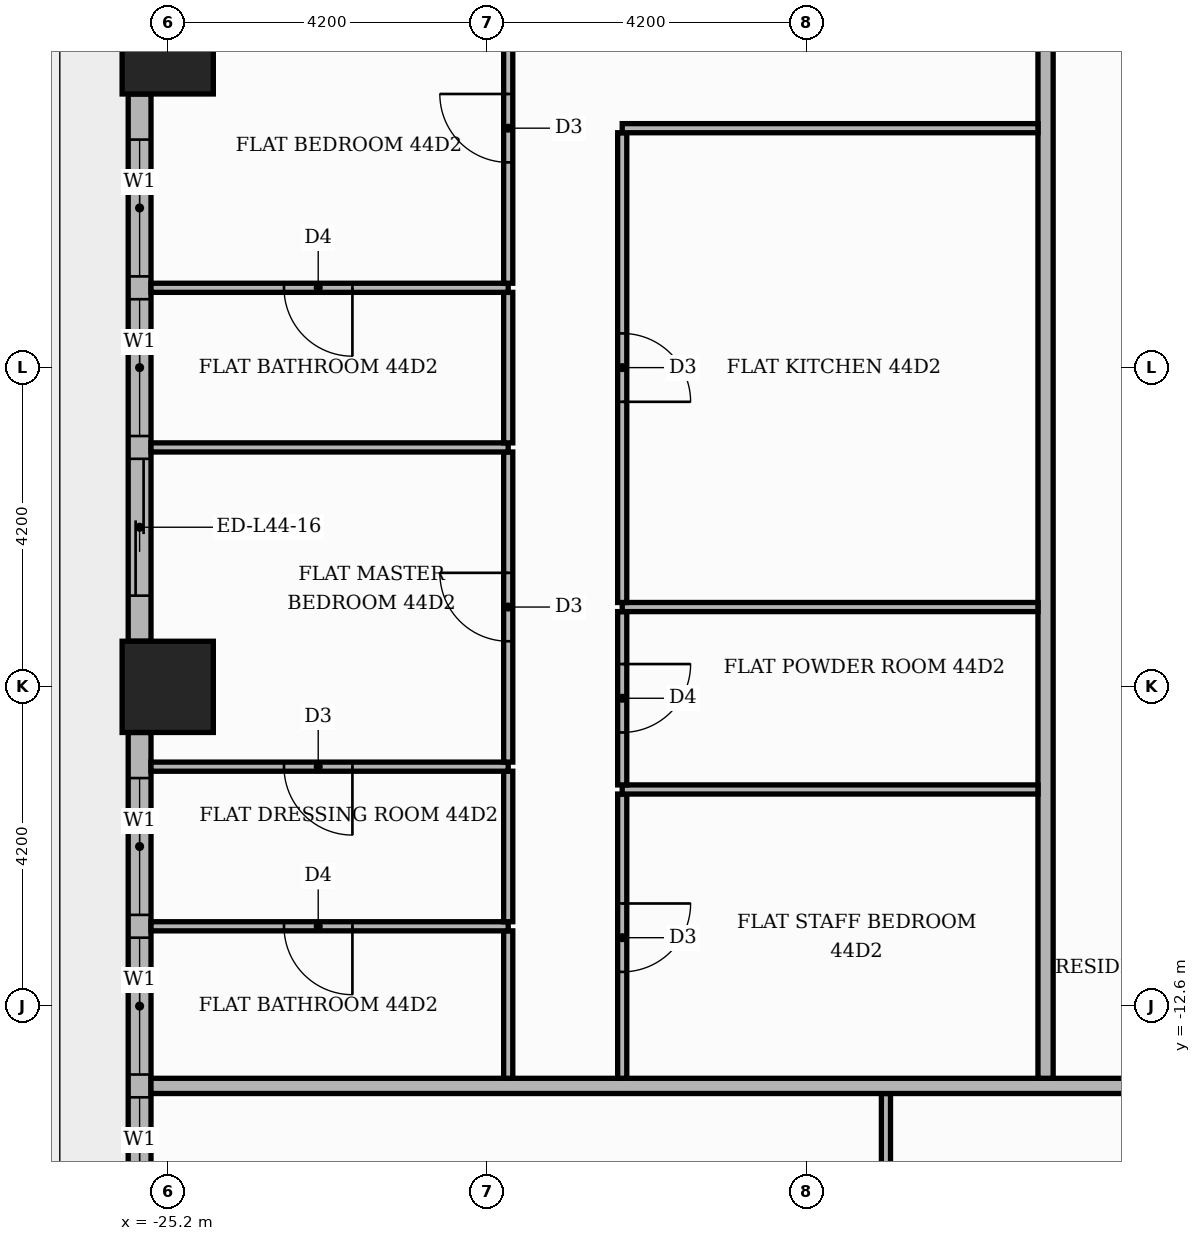
"""IFC4 building model, lengths in metres.
Left out: names, types, materials, properties, quantities, classifications, styles, units other than length and angle.
Written with IfcOpenShell. Run it as: python <this file> out.ifc"""

import sys

from ifc_helpers import new_model, si_unit, direction, frame, frame_2d, origin, origin_2d, place, context, subcontext, project, spatial, rectangle, extrude, element, fill, save


model = new_model("IFC4")
c1 = context("Model", 3, precision=1e-05, world=origin(), true_north=direction((0.0, 1.0)))
c2 = subcontext(c1, "Body", "Model", "MODEL_VIEW")
j1 = project(units=[si_unit("LENGTHUNIT", "METRE"), si_unit("PLANEANGLEUNIT", "RADIAN")], contexts=[c1])
p1 = place(None, origin())
s1 = spatial("IfcSite", under=j1, at=p1, CompositionType="ELEMENT")
p2 = place(p1, origin())
s2 = spatial("IfcBuilding", under=s1, at=p2, CompositionType="ELEMENT")
p3 = place(p2, frame((0.0, 0.0, 188.4)))
s3 = spatial("IfcBuildingStorey", under=s2, at=p3, CompositionType="ELEMENT", Elevation=188.4)
for number, where, z_axis, x_axis in (
    (1, (-25.2, 0.0, 0.0), (0.0, 0.0, 1.0), (1.0, 0.0, 0.0)),
    (2, (-25.2, -8.4, 0.0), (0.0, 0.0, 1.0), (1.0, 0.0, 0.0)),
):
    element("IfcColumn", number, at=place(p3, frame(where, z_axis=z_axis, x_axis=x_axis)), inside=s3, PredefinedType="COLUMN", context=c2, shape_type="SweptSolid", body=[
        extrude(rectangle(XDim=1.2, YDim=1.2, at=origin_2d()), origin(), (0.0, 0.0, 1.0), 3.9),
    ])
p4 = place(p3, frame((-25.57, -0.6, 0.0), z_axis=(0.0, 0.0, 1.0), x_axis=(0.0, -1.0, 0.0)))
e3 = element("IfcWall", 3, at=p4, inside=s3, PredefinedType="STANDARD", context=c2, shape_type="SweptSolid", body=[
    extrude(rectangle(XDim=7.2, YDim=0.3, at=frame_2d((3.6, 0.0))), origin(), (0.0, 0.0, 1.0), 3.48),
])
p5 = place(p4, frame((0.6, 0.0, 0.9)))
e4 = element("IfcOpeningElement", 4, at=p5, cuts=e3, PredefinedType="OPENING", context=c2, shape_type="SweptSolid", body=[
    extrude(rectangle(XDim=1.8, YDim=2.1, at=frame_2d((0.9, 1.05))), frame((0.0, 0.16, 0.0), z_axis=(0.0, -1.0, 0.0), x_axis=(1.0, 0.0, 0.0)), (0.0, 0.0, 1.0), 0.32),
])
p6 = place(p4, frame((2.7, 0.0, 0.9)))
e5 = element("IfcOpeningElement", 5, at=p6, cuts=e3, PredefinedType="OPENING", context=c2, shape_type="SweptSolid", body=[
    extrude(rectangle(XDim=1.8, YDim=2.1, at=frame_2d((0.9, 1.05))), frame((0.0, 0.16, 0.0), z_axis=(0.0, -1.0, 0.0), x_axis=(1.0, 0.0, 0.0)), (0.0, 0.0, 1.0), 0.32),
])
p7 = place(p4, frame((4.8, 0.0, 0.0)))
e6 = element("IfcOpeningElement", 6, at=p7, cuts=e3, PredefinedType="OPENING", context=c2, shape_type="SweptSolid", body=[
    extrude(rectangle(XDim=1.8, YDim=2.4, at=frame_2d((0.9, 1.2))), frame((0.0, 0.16, 0.0), z_axis=(0.0, -1.0, 0.0), x_axis=(1.0, 0.0, 0.0)), (0.0, 0.0, 1.0), 0.32),
])
p8 = place(p3, frame((-25.57, -9.0, 0.0), z_axis=(0.0, 0.0, 1.0), x_axis=(0.0, -1.0, 0.0)))
e7 = element("IfcWall", 7, at=p8, inside=s3, PredefinedType="STANDARD", context=c2, shape_type="SweptSolid", body=[
    extrude(rectangle(XDim=7.2, YDim=0.3, at=frame_2d((3.6, 0.0))), origin(), (0.0, 0.0, 1.0), 3.48),
])
p9 = place(p8, frame((0.6, 0.0, 0.9)))
e8 = element("IfcOpeningElement", 8, at=p9, cuts=e7, PredefinedType="OPENING", context=c2, shape_type="SweptSolid", body=[
    extrude(rectangle(XDim=1.8, YDim=2.1, at=frame_2d((0.9, 1.05))), frame((0.0, 0.16, 0.0), z_axis=(0.0, -1.0, 0.0), x_axis=(1.0, 0.0, 0.0)), (0.0, 0.0, 1.0), 0.32),
])
p10 = place(p8, frame((2.7, 0.0, 0.9)))
e9 = element("IfcOpeningElement", 9, at=p10, cuts=e7, PredefinedType="OPENING", context=c2, shape_type="SweptSolid", body=[
    extrude(rectangle(XDim=1.8, YDim=2.1, at=frame_2d((0.9, 1.05))), frame((0.0, 0.16, 0.0), z_axis=(0.0, -1.0, 0.0), x_axis=(1.0, 0.0, 0.0)), (0.0, 0.0, 1.0), 0.32),
])
p11 = place(p8, frame((4.8, 0.0, 0.9)))
e10 = element("IfcOpeningElement", 10, at=p11, cuts=e7, PredefinedType="OPENING", context=c2, shape_type="SweptSolid", body=[
    extrude(rectangle(XDim=1.8, YDim=2.1, at=frame_2d((0.9, 1.05))), frame((0.0, 0.16, 0.0), z_axis=(0.0, -1.0, 0.0), x_axis=(1.0, 0.0, 0.0)), (0.0, 0.0, 1.0), 0.32),
])
p12 = place(p3, frame((-15.75, -20.06, 0.0), z_axis=(0.0, 0.0, 1.0), x_axis=(0.0, 1.0, 0.0)))
e11 = element("IfcWall", 11, at=p12, inside=s3, PredefinedType="PARTITIONING", context=c2, shape_type="SweptSolid", body=[
    extrude(rectangle(XDim=6.31, YDim=0.12, at=frame_2d((3.155, 0.0))), origin(), (0.0, 0.0, 1.0), 3.48),
])
p13 = place(p12, frame((2.675, 0.0, 0.0)))
e12 = element("IfcOpeningElement", 12, at=p13, cuts=e11, PredefinedType="OPENING", context=c2, shape_type="SweptSolid", body=[
    extrude(rectangle(XDim=1.0, YDim=2.1, at=frame_2d((0.5, 1.05))), frame((0.0, 0.07, 0.0), z_axis=(0.0, -1.0, 0.0), x_axis=(1.0, 0.0, 0.0)), (0.0, 0.0, 1.0), 0.14),
])
p14 = place(p3, frame((-25.42, -13.65, 0.0), z_axis=(0.0, 0.0, 1.0), x_axis=(1.0, 0.0, 0.0)))
e13 = element("IfcWall", 13, at=p14, inside=s3, PredefinedType="PARTITIONING", context=c2, shape_type="SweptSolid", body=[
    extrude(rectangle(XDim=39.07, YDim=0.2, at=frame_2d((19.535, 0.0))), origin(), (0.0, 0.0, 1.0), 3.48),
])
p15 = place(p14, frame((13.32, 0.0, 0.0)))
e14 = element("IfcOpeningElement", 14, at=p15, cuts=e13, PredefinedType="OPENING", context=c2, shape_type="SweptSolid", body=[
    extrude(rectangle(XDim=1.1, YDim=2.4, at=frame_2d((0.55, 1.2))), frame((0.0, 0.11, 0.0), z_axis=(0.0, -1.0, 0.0), x_axis=(1.0, 0.0, 0.0)), (0.0, 0.0, 1.0), 0.22),
])
p16 = place(p14, frame((21.72, 0.0, 0.0)))
e15 = element("IfcOpeningElement", 15, at=p16, cuts=e13, PredefinedType="OPENING", context=c2, shape_type="SweptSolid", body=[
    extrude(rectangle(XDim=1.1, YDim=2.4, at=frame_2d((0.55, 1.2))), frame((0.0, 0.11, 0.0), z_axis=(0.0, -1.0, 0.0), x_axis=(1.0, 0.0, 0.0)), (0.0, 0.0, 1.0), 0.22),
])
p17 = place(p3, frame((-20.72, -13.55, 0.0), z_axis=(0.0, 0.0, 1.0), x_axis=(0.0, 1.0, 0.0)))
e16 = element("IfcWall", 16, at=p17, inside=s3, PredefinedType="PARTITIONING", context=c2, shape_type="SweptSolid", body=[
    extrude(rectangle(XDim=1.94, YDim=0.12, at=frame_2d((0.97, 0.0))), origin(), (0.0, 0.0, 1.0), 3.48),
])
p18 = place(p3, frame((-19.22, -13.55, 0.0), z_axis=(0.0, 0.0, 1.0), x_axis=(0.0, 1.0, 0.0)))
e17 = element("IfcWall", 17, at=p18, inside=s3, PredefinedType="PARTITIONING", context=c2, shape_type="SweptSolid", body=[
    extrude(rectangle(XDim=3.74, YDim=0.12, at=frame_2d((1.87, 0.0))), origin(), (0.0, 0.0, 1.0), 3.48),
])
p19 = place(p18, frame((1.4, 0.0, 0.0)))
e18 = element("IfcOpeningElement", 18, at=p19, cuts=e17, PredefinedType="OPENING", context=c2, shape_type="SweptSolid", body=[
    extrude(rectangle(XDim=0.9, YDim=2.1, at=frame_2d((0.45, 1.05))), frame((0.0, 0.07, 0.0), z_axis=(0.0, -1.0, 0.0), x_axis=(1.0, 0.0, 0.0)), (0.0, 0.0, 1.0), 0.14),
])
p20 = place(p3, frame((-13.65, -13.55, 0.0), z_axis=(0.0, 0.0, 1.0), x_axis=(0.0, 1.0, 0.0)))
e19 = element("IfcWall", 19, at=p20, inside=s3, PredefinedType="PARTITIONING", context=c2, shape_type="SweptSolid", body=[
    extrude(rectangle(XDim=18.7, YDim=0.2, at=frame_2d((9.35, 0.0))), origin(), (0.0, 0.0, 1.0), 3.48),
])
p21 = place(p20, frame((14.05, 0.0, 0.0)))
e20 = element("IfcOpeningElement", 20, at=p21, cuts=e19, PredefinedType="OPENING", context=c2, shape_type="SweptSolid", body=[
    extrude(rectangle(XDim=1.1, YDim=2.4, at=frame_2d((0.55, 1.2))), frame((0.0, 0.11, 0.0), z_axis=(0.0, -1.0, 0.0), x_axis=(1.0, 0.0, 0.0)), (0.0, 0.0, 1.0), 0.22),
])
p22 = place(p3, frame((-25.42, -11.55, 0.0), z_axis=(0.0, 0.0, 1.0), x_axis=(1.0, 0.0, 0.0)))
e21 = element("IfcWall", 21, at=p22, inside=s3, PredefinedType="PARTITIONING", context=c2, shape_type="SweptSolid", body=[
    extrude(rectangle(XDim=4.7, YDim=0.12, at=frame_2d((2.35, 0.0))), origin(), (0.0, 0.0, 1.0), 3.48),
])
p23 = place(p22, frame((1.75, 0.0, 0.0)))
e22 = element("IfcOpeningElement", 22, at=p23, cuts=e21, PredefinedType="OPENING", context=c2, shape_type="SweptSolid", body=[
    extrude(rectangle(XDim=0.9, YDim=2.1, at=frame_2d((0.45, 1.05))), frame((0.0, 0.07, 0.0), z_axis=(0.0, -1.0, 0.0), x_axis=(1.0, 0.0, 0.0)), (0.0, 0.0, 1.0), 0.14),
])
p24 = place(p3, frame((-20.72, -11.49, 0.0), z_axis=(0.0, 0.0, 1.0), x_axis=(0.0, 1.0, 0.0)))
e23 = element("IfcWall", 23, at=p24, inside=s3, PredefinedType="PARTITIONING", context=c2, shape_type="SweptSolid", body=[
    extrude(rectangle(XDim=1.98, YDim=0.12, at=frame_2d((0.99, 0.0))), origin(), (0.0, 0.0, 1.0), 3.48),
])
p25 = place(p3, frame((-19.22, -9.75, 0.0), z_axis=(0.0, 0.0, 1.0), x_axis=(1.0, 0.0, 0.0)))
e24 = element("IfcWall", 24, at=p25, inside=s3, PredefinedType="PARTITIONING", context=c2, shape_type="SweptSolid", body=[
    extrude(rectangle(XDim=5.47, YDim=0.12, at=frame_2d((2.735, 0.0))), origin(), (0.0, 0.0, 1.0), 3.48),
])
p26 = place(p3, frame((-19.22, -9.69, 0.0), z_axis=(0.0, 0.0, 1.0), x_axis=(0.0, 1.0, 0.0)))
e25 = element("IfcWall", 25, at=p26, inside=s3, PredefinedType="PARTITIONING", context=c2, shape_type="SweptSolid", body=[
    extrude(rectangle(XDim=2.28, YDim=0.12, at=frame_2d((1.14, 0.0))), origin(), (0.0, 0.0, 1.0), 3.48),
])
p27 = place(p26, frame((0.69, 0.0, 0.0)))
e26 = element("IfcOpeningElement", 26, at=p27, cuts=e25, PredefinedType="OPENING", context=c2, shape_type="SweptSolid", body=[
    extrude(rectangle(XDim=0.9, YDim=2.1, at=frame_2d((0.45, 1.05))), frame((0.0, 0.07, 0.0), z_axis=(0.0, -1.0, 0.0), x_axis=(1.0, 0.0, 0.0)), (0.0, 0.0, 1.0), 0.14),
])
p28 = place(p3, frame((-25.42, -9.45, 0.0), z_axis=(0.0, 0.0, 1.0), x_axis=(1.0, 0.0, 0.0)))
e27 = element("IfcWall", 27, at=p28, inside=s3, PredefinedType="PARTITIONING", context=c2, shape_type="SweptSolid", body=[
    extrude(rectangle(XDim=4.7, YDim=0.12, at=frame_2d((2.35, 0.0))), origin(), (0.0, 0.0, 1.0), 3.48),
])
p29 = place(p28, frame((1.75, 0.0, 0.0)))
e28 = element("IfcOpeningElement", 28, at=p29, cuts=e27, PredefinedType="OPENING", context=c2, shape_type="SweptSolid", body=[
    extrude(rectangle(XDim=0.9, YDim=2.1, at=frame_2d((0.45, 1.05))), frame((0.0, 0.07, 0.0), z_axis=(0.0, -1.0, 0.0), x_axis=(1.0, 0.0, 0.0)), (0.0, 0.0, 1.0), 0.14),
])
p30 = place(p3, frame((-20.72, -9.39, 0.0), z_axis=(0.0, 0.0, 1.0), x_axis=(0.0, 1.0, 0.0)))
e29 = element("IfcWall", 29, at=p30, inside=s3, PredefinedType="PARTITIONING", context=c2, shape_type="SweptSolid", body=[
    extrude(rectangle(XDim=4.08, YDim=0.12, at=frame_2d((2.04, 0.0))), origin(), (0.0, 0.0, 1.0), 3.48),
])
p31 = place(p30, frame((1.59, 0.0, 0.0)))
e30 = element("IfcOpeningElement", 30, at=p31, cuts=e29, PredefinedType="OPENING", context=c2, shape_type="SweptSolid", body=[
    extrude(rectangle(XDim=0.9, YDim=2.1, at=frame_2d((0.45, 1.05))), frame((0.0, 0.07, 0.0), z_axis=(0.0, -1.0, 0.0), x_axis=(1.0, 0.0, 0.0)), (0.0, 0.0, 1.0), 0.14),
])
p32 = place(p3, frame((-19.22, -7.35, 0.0), z_axis=(0.0, 0.0, 1.0), x_axis=(1.0, 0.0, 0.0)))
e31 = element("IfcWall", 31, at=p32, inside=s3, PredefinedType="PARTITIONING", context=c2, shape_type="SweptSolid", body=[
    extrude(rectangle(XDim=5.47, YDim=0.12, at=frame_2d((2.735, 0.0))), origin(), (0.0, 0.0, 1.0), 3.48),
])
p33 = place(p3, frame((-19.22, -7.29, 0.0), z_axis=(0.0, 0.0, 1.0), x_axis=(0.0, 1.0, 0.0)))
e32 = element("IfcWall", 32, at=p33, inside=s3, PredefinedType="PARTITIONING", context=c2, shape_type="SweptSolid", body=[
    extrude(rectangle(XDim=6.18, YDim=0.12, at=frame_2d((3.09, 0.0))), origin(), (0.0, 0.0, 1.0), 3.48),
])
p34 = place(p33, frame((2.64, 0.0, 0.0)))
e33 = element("IfcOpeningElement", 33, at=p34, cuts=e32, PredefinedType="OPENING", context=c2, shape_type="SweptSolid", body=[
    extrude(rectangle(XDim=0.9, YDim=2.1, at=frame_2d((0.45, 1.05))), frame((0.0, 0.07, 0.0), z_axis=(0.0, -1.0, 0.0), x_axis=(1.0, 0.0, 0.0)), (0.0, 0.0, 1.0), 0.14),
])
p35 = place(p3, frame((-25.42, -5.25, 0.0), z_axis=(0.0, 0.0, 1.0), x_axis=(1.0, 0.0, 0.0)))
e34 = element("IfcWall", 34, at=p35, inside=s3, PredefinedType="PARTITIONING", context=c2, shape_type="SweptSolid", body=[
    extrude(rectangle(XDim=4.7, YDim=0.12, at=frame_2d((2.35, 0.0))), origin(), (0.0, 0.0, 1.0), 3.48),
])
p36 = place(p3, frame((-20.72, -5.19, 0.0), z_axis=(0.0, 0.0, 1.0), x_axis=(0.0, 1.0, 0.0)))
e35 = element("IfcWall", 35, at=p36, inside=s3, PredefinedType="PARTITIONING", context=c2, shape_type="SweptSolid", body=[
    extrude(rectangle(XDim=1.98, YDim=0.12, at=frame_2d((0.99, 0.0))), origin(), (0.0, 0.0, 1.0), 3.48),
])
p37 = place(p3, frame((-25.42, -3.15, 0.0), z_axis=(0.0, 0.0, 1.0), x_axis=(1.0, 0.0, 0.0)))
e36 = element("IfcWall", 36, at=p37, inside=s3, PredefinedType="PARTITIONING", context=c2, shape_type="SweptSolid", body=[
    extrude(rectangle(XDim=4.7, YDim=0.12, at=frame_2d((2.35, 0.0))), origin(), (0.0, 0.0, 1.0), 3.48),
])
p38 = place(p37, frame((1.75, 0.0, 0.0)))
e37 = element("IfcOpeningElement", 37, at=p38, cuts=e36, PredefinedType="OPENING", context=c2, shape_type="SweptSolid", body=[
    extrude(rectangle(XDim=0.9, YDim=2.1, at=frame_2d((0.45, 1.05))), frame((0.0, 0.07, 0.0), z_axis=(0.0, -1.0, 0.0), x_axis=(1.0, 0.0, 0.0)), (0.0, 0.0, 1.0), 0.14),
])
p39 = place(p3, frame((-20.72, -3.09, 0.0), z_axis=(0.0, 0.0, 1.0), x_axis=(0.0, 1.0, 0.0)))
e38 = element("IfcWall", 38, at=p39, inside=s3, PredefinedType="PARTITIONING", context=c2, shape_type="SweptSolid", body=[
    extrude(rectangle(XDim=4.08, YDim=0.12, at=frame_2d((2.04, 0.0))), origin(), (0.0, 0.0, 1.0), 3.48),
])
p40 = place(p39, frame((1.59, 0.0, 0.0)))
e39 = element("IfcOpeningElement", 39, at=p40, cuts=e38, PredefinedType="OPENING", context=c2, shape_type="SweptSolid", body=[
    extrude(rectangle(XDim=0.9, YDim=2.1, at=frame_2d((0.45, 1.05))), frame((0.0, 0.07, 0.0), z_axis=(0.0, -1.0, 0.0), x_axis=(1.0, 0.0, 0.0)), (0.0, 0.0, 1.0), 0.14),
])
p41 = place(p3, frame((-19.22, -1.05, 0.0), z_axis=(0.0, 0.0, 1.0), x_axis=(1.0, 0.0, 0.0)))
e40 = element("IfcWall", 40, at=p41, inside=s3, PredefinedType="PARTITIONING", context=c2, shape_type="SweptSolid", body=[
    extrude(rectangle(XDim=5.47, YDim=0.12, at=frame_2d((2.735, 0.0))), origin(), (0.0, 0.0, 1.0), 3.48),
])
p42 = place(p5, origin())
e41 = element("IfcWindow", 41, at=p42, inside=s3, PartitioningType="SINGLE_PANEL", PredefinedType="WINDOW", context=c2, shape_type="SweptSolid", body=[
    extrude(rectangle(XDim=1.8, YDim=2.1, at=frame_2d((0.9, 1.05))), frame((0.0, 0.03, 0.0), z_axis=(0.0, -1.0, 0.0), x_axis=(1.0, 0.0, 0.0)), (0.0, 0.0, 1.0), 0.06),
])
fill(e4, e41)
p43 = place(p6, origin())
e42 = element("IfcWindow", 42, at=p43, inside=s3, PartitioningType="SINGLE_PANEL", PredefinedType="WINDOW", context=c2, shape_type="SweptSolid", body=[
    extrude(rectangle(XDim=1.8, YDim=2.1, at=frame_2d((0.9, 1.05))), frame((0.0, 0.03, 0.0), z_axis=(0.0, -1.0, 0.0), x_axis=(1.0, 0.0, 0.0)), (0.0, 0.0, 1.0), 0.06),
])
fill(e5, e42)
p44 = place(p7, origin())
e43 = element("IfcDoor", 43, at=p44, inside=s3, OperationType="SLIDING_TO_RIGHT", PredefinedType="DOOR", context=c2, shape_type="SweptSolid", body=[
    extrude(rectangle(XDim=1.8, YDim=2.4, at=frame_2d((0.9, 1.2))), frame((0.0, 0.025, 0.0), z_axis=(0.0, -1.0, 0.0), x_axis=(1.0, 0.0, 0.0)), (0.0, 0.0, 1.0), 0.05),
])
fill(e6, e43)
p45 = place(p9, origin())
e44 = element("IfcWindow", 44, at=p45, inside=s3, PartitioningType="SINGLE_PANEL", PredefinedType="WINDOW", context=c2, shape_type="SweptSolid", body=[
    extrude(rectangle(XDim=1.8, YDim=2.1, at=frame_2d((0.9, 1.05))), frame((0.0, 0.03, 0.0), z_axis=(0.0, -1.0, 0.0), x_axis=(1.0, 0.0, 0.0)), (0.0, 0.0, 1.0), 0.06),
])
fill(e8, e44)
p46 = place(p10, origin())
e45 = element("IfcWindow", 45, at=p46, inside=s3, PartitioningType="SINGLE_PANEL", PredefinedType="WINDOW", context=c2, shape_type="SweptSolid", body=[
    extrude(rectangle(XDim=1.8, YDim=2.1, at=frame_2d((0.9, 1.05))), frame((0.0, 0.03, 0.0), z_axis=(0.0, -1.0, 0.0), x_axis=(1.0, 0.0, 0.0)), (0.0, 0.0, 1.0), 0.06),
])
fill(e9, e45)
p47 = place(p11, origin())
e46 = element("IfcWindow", 46, at=p47, inside=s3, PartitioningType="SINGLE_PANEL", PredefinedType="WINDOW", context=c2, shape_type="SweptSolid", body=[
    extrude(rectangle(XDim=1.8, YDim=2.1, at=frame_2d((0.9, 1.05))), frame((0.0, 0.03, 0.0), z_axis=(0.0, -1.0, 0.0), x_axis=(1.0, 0.0, 0.0)), (0.0, 0.0, 1.0), 0.06),
])
fill(e10, e46)
p48 = place(p34, frame((0.9, 0.0, 0.0), z_axis=(0.0, 0.0, 1.0), x_axis=(-1.0, 0.0, 0.0)))
e47 = element("IfcDoor", 47, at=p48, inside=s3, OperationType="SINGLE_SWING_LEFT", PredefinedType="DOOR", context=c2, shape_type="SweptSolid", body=[
    extrude(rectangle(XDim=0.9, YDim=2.1, at=frame_2d((0.45, 1.05))), frame((0.0, 0.025, 0.0), z_axis=(0.0, -1.0, 0.0), x_axis=(1.0, 0.0, 0.0)), (0.0, 0.0, 1.0), 0.05),
])
fill(e33, e47)
p49 = place(p27, frame((0.9, 0.0, 0.0), z_axis=(0.0, 0.0, 1.0), x_axis=(-1.0, 0.0, 0.0)))
e48 = element("IfcDoor", 48, at=p49, inside=s3, OperationType="SINGLE_SWING_RIGHT", PredefinedType="DOOR", context=c2, shape_type="SweptSolid", body=[
    extrude(rectangle(XDim=0.9, YDim=2.1, at=frame_2d((0.45, 1.05))), frame((0.0, 0.025, 0.0), z_axis=(0.0, -1.0, 0.0), x_axis=(1.0, 0.0, 0.0)), (0.0, 0.0, 1.0), 0.05),
])
fill(e26, e48)
p50 = place(p19, frame((0.9, 0.0, 0.0), z_axis=(0.0, 0.0, 1.0), x_axis=(-1.0, 0.0, 0.0)))
e49 = element("IfcDoor", 49, at=p50, inside=s3, OperationType="SINGLE_SWING_RIGHT", PredefinedType="DOOR", context=c2, shape_type="SweptSolid", body=[
    extrude(rectangle(XDim=0.9, YDim=2.1, at=frame_2d((0.45, 1.05))), frame((0.0, 0.025, 0.0), z_axis=(0.0, -1.0, 0.0), x_axis=(1.0, 0.0, 0.0)), (0.0, 0.0, 1.0), 0.05),
])
fill(e18, e49)
p51 = place(p40, origin())
e50 = element("IfcDoor", 50, at=p51, inside=s3, OperationType="SINGLE_SWING_RIGHT", PredefinedType="DOOR", context=c2, shape_type="SweptSolid", body=[
    extrude(rectangle(XDim=0.9, YDim=2.1, at=frame_2d((0.45, 1.05))), frame((0.0, 0.025, 0.0), z_axis=(0.0, -1.0, 0.0), x_axis=(1.0, 0.0, 0.0)), (0.0, 0.0, 1.0), 0.05),
])
fill(e39, e50)
p52 = place(p38, frame((0.9, 0.0, 0.0), z_axis=(0.0, 0.0, 1.0), x_axis=(-1.0, 0.0, 0.0)))
e51 = element("IfcDoor", 51, at=p52, inside=s3, OperationType="SINGLE_SWING_RIGHT", PredefinedType="DOOR", context=c2, shape_type="SweptSolid", body=[
    extrude(rectangle(XDim=0.9, YDim=2.1, at=frame_2d((0.45, 1.05))), frame((0.0, 0.025, 0.0), z_axis=(0.0, -1.0, 0.0), x_axis=(1.0, 0.0, 0.0)), (0.0, 0.0, 1.0), 0.05),
])
fill(e37, e51)
p53 = place(p31, origin())
e52 = element("IfcDoor", 52, at=p53, inside=s3, OperationType="SINGLE_SWING_RIGHT", PredefinedType="DOOR", context=c2, shape_type="SweptSolid", body=[
    extrude(rectangle(XDim=0.9, YDim=2.1, at=frame_2d((0.45, 1.05))), frame((0.0, 0.025, 0.0), z_axis=(0.0, -1.0, 0.0), x_axis=(1.0, 0.0, 0.0)), (0.0, 0.0, 1.0), 0.05),
])
fill(e30, e52)
p54 = place(p29, frame((0.9, 0.0, 0.0), z_axis=(0.0, 0.0, 1.0), x_axis=(-1.0, 0.0, 0.0)))
e53 = element("IfcDoor", 53, at=p54, inside=s3, OperationType="SINGLE_SWING_RIGHT", PredefinedType="DOOR", context=c2, shape_type="SweptSolid", body=[
    extrude(rectangle(XDim=0.9, YDim=2.1, at=frame_2d((0.45, 1.05))), frame((0.0, 0.025, 0.0), z_axis=(0.0, -1.0, 0.0), x_axis=(1.0, 0.0, 0.0)), (0.0, 0.0, 1.0), 0.05),
])
fill(e28, e53)
p55 = place(p23, frame((0.9, 0.0, 0.0), z_axis=(0.0, 0.0, 1.0), x_axis=(-1.0, 0.0, 0.0)))
e54 = element("IfcDoor", 54, at=p55, inside=s3, OperationType="SINGLE_SWING_RIGHT", PredefinedType="DOOR", context=c2, shape_type="SweptSolid", body=[
    extrude(rectangle(XDim=0.9, YDim=2.1, at=frame_2d((0.45, 1.05))), frame((0.0, 0.025, 0.0), z_axis=(0.0, -1.0, 0.0), x_axis=(1.0, 0.0, 0.0)), (0.0, 0.0, 1.0), 0.05),
])
fill(e22, e54)
save(model, sys.argv[1])
